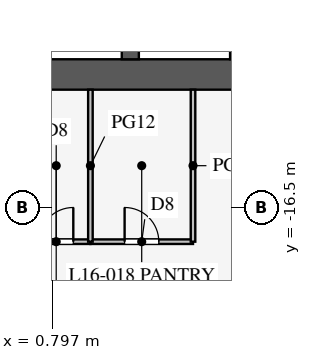
"""IFC4 building model, lengths in metres.
Left out: names, types, materials, properties, quantities, classifications, styles, units other than length and angle.
Written with IfcOpenShell. Run it as: python <this file> out.ifc"""

import sys

from ifc_helpers import new_model, si_unit, direction, frame, frame_2d, origin, place, context, subcontext, project, spatial, rectangle, extrude, element, fill, save


model = new_model("IFC4")
c1 = context("Model", 3, precision=1e-05, world=origin(), true_north=direction((0.0, 1.0)))
c2 = subcontext(c1, "Body", "Model", "MODEL_VIEW")
j1 = project(units=[si_unit("LENGTHUNIT", "METRE"), si_unit("PLANEANGLEUNIT", "RADIAN")], contexts=[c1])
p1 = place(None, origin())
s1 = spatial("IfcSite", under=j1, at=p1, CompositionType="ELEMENT")
p2 = place(p1, origin())
s2 = spatial("IfcBuilding", under=s1, at=p2, CompositionType="ELEMENT")
p3 = place(p2, frame((0.0, 0.0, 71.1)))
s3 = spatial("IfcBuildingStorey", under=s2, at=p3, CompositionType="ELEMENT", Elevation=71.1)
p4 = place(p3, frame((-10.97, -13.0, 0.0), z_axis=(0.0, 0.0, 1.0), x_axis=(1.0, 0.0, 0.0)))
e1 = element("IfcWall", 1, at=p4, inside=s3, PredefinedType="SHEAR", context=c2, shape_type="SweptSolid", body=[
    extrude(rectangle(XDim=21.939, YDim=0.8, at=frame_2d((10.97, 0.0))), origin(), (0.0, 0.0, 1.0), 4.2),
])
p5 = place(p4, frame((17.27, 0.0, 0.0)))
e2 = element("IfcOpeningElement", 2, at=p5, cuts=e1, PredefinedType="OPENING", context=c2, shape_type="SweptSolid", body=[
    extrude(rectangle(XDim=1.2, YDim=2.1, at=frame_2d((0.6, 1.05))), frame((0.0, 0.41, 0.0), z_axis=(0.0, -1.0, 0.0), x_axis=(1.0, 0.0, 0.0)), (0.0, 0.0, 1.0), 0.82),
])
p6 = place(p4, frame((3.47, 0.0, 0.0)))
e3 = element("IfcOpeningElement", 3, at=p6, cuts=e1, PredefinedType="OPENING", context=c2, shape_type="SweptSolid", body=[
    extrude(rectangle(XDim=1.2, YDim=2.1, at=frame_2d((0.6, 1.05))), frame((0.0, 0.41, 0.0), z_axis=(0.0, -1.0, 0.0), x_axis=(1.0, 0.0, 0.0)), (0.0, 0.0, 1.0), 0.82),
])
for number, where, z_axis, x_axis in (
    (4, (2.85, -10.025, 0.0), (0.0, 0.0, 1.0), (0.0, -1.0, 0.0)),
    (5, (5.7, -10.025, 0.0), (0.0, 0.0, 1.0), (0.0, -1.0, 0.0)),
):
    element("IfcWall", number, at=place(p3, frame(where, z_axis=z_axis, x_axis=x_axis)), inside=s3, PredefinedType="SHEAR", context=c2, shape_type="SweptSolid", body=[
        extrude(rectangle(XDim=2.575, YDim=0.45, at=frame_2d((1.288, 0.0))), origin(), (0.0, 0.0, 1.0), 4.2),
    ])
p7 = place(p3, frame((1.8, -17.4, 0.0), z_axis=(0.0, 0.0, 1.0), x_axis=(1.0, 0.0, 0.0)))
e6 = element("IfcWall", 6, at=p7, inside=s3, PredefinedType="PARTITIONING", context=c2, shape_type="SweptSolid", body=[
    extrude(rectangle(XDim=2.7, YDim=0.12, at=frame_2d((1.35, 0.0))), origin(), (0.0, 0.0, 1.0), 2.9),
])
p8 = place(p7, frame((0.9, 0.0, 0.15)))
e7 = element("IfcOpeningElement", 7, at=p8, cuts=e6, PredefinedType="OPENING", context=c2, shape_type="SweptSolid", body=[
    extrude(rectangle(XDim=0.9, YDim=2.1, at=frame_2d((0.45, 1.05))), frame((0.0, 0.07, 0.0), z_axis=(0.0, -1.0, 0.0), x_axis=(1.0, 0.0, 0.0)), (0.0, 0.0, 1.0), 0.14),
])
p9 = place(p3, frame((0.0, -17.4, 0.0), z_axis=(0.0, 0.0, 1.0), x_axis=(1.0, 0.0, 0.0)))
e8 = element("IfcWall", 8, at=p9, inside=s3, PredefinedType="PARTITIONING", context=c2, shape_type="SweptSolid", body=[
    extrude(rectangle(XDim=1.8, YDim=0.12, at=frame_2d((0.9, 0.0))), origin(), (0.0, 0.0, 1.0), 2.9),
])
p10 = place(p9, frame((0.45, 0.0, 0.15)))
e9 = element("IfcOpeningElement", 9, at=p10, cuts=e8, PredefinedType="OPENING", context=c2, shape_type="SweptSolid", body=[
    extrude(rectangle(XDim=0.9, YDim=2.1, at=frame_2d((0.45, 1.05))), frame((0.0, 0.07, 0.0), z_axis=(0.0, -1.0, 0.0), x_axis=(1.0, 0.0, 0.0)), (0.0, 0.0, 1.0), 0.14),
])
p11 = place(p3, frame((1.8, -13.4, 0.0), z_axis=(0.0, 0.0, 1.0), x_axis=(0.0, -1.0, 0.0)))
e10 = element("IfcWall", 10, at=p11, inside=s3, PredefinedType="PARTITIONING", context=c2, shape_type="SweptSolid", body=[
    extrude(rectangle(XDim=4.0, YDim=0.12, at=frame_2d((2.0, 0.0))), origin(), (0.0, 0.0, 1.0), 2.9),
])
p12 = place(p3, frame((4.5, -13.4, 0.0), z_axis=(0.0, 0.0, 1.0), x_axis=(0.0, -1.0, 0.0)))
e11 = element("IfcWall", 11, at=p12, inside=s3, PredefinedType="PARTITIONING", context=c2, shape_type="SweptSolid", body=[
    extrude(rectangle(XDim=4.0, YDim=0.12, at=frame_2d((2.0, 0.0))), origin(), (0.0, 0.0, 1.0), 2.8),
])
p13 = place(p10, origin())
e12 = element("IfcDoor", 12, at=p13, inside=s3, OperationType="SINGLE_SWING_RIGHT", PredefinedType="DOOR", context=c2, shape_type="SweptSolid", body=[
    extrude(rectangle(XDim=0.9, YDim=2.1, at=frame_2d((0.45, 1.05))), frame((0.0, 0.025, 0.0), z_axis=(0.0, -1.0, 0.0), x_axis=(1.0, 0.0, 0.0)), (0.0, 0.0, 1.0), 0.05),
])
fill(e9, e12)
p14 = place(p8, origin())
e13 = element("IfcDoor", 13, at=p14, inside=s3, OperationType="SINGLE_SWING_LEFT", PredefinedType="DOOR", context=c2, shape_type="SweptSolid", body=[
    extrude(rectangle(XDim=0.9, YDim=2.1, at=frame_2d((0.45, 1.05))), frame((0.0, 0.025, 0.0), z_axis=(0.0, -1.0, 0.0), x_axis=(1.0, 0.0, 0.0)), (0.0, 0.0, 1.0), 0.05),
])
fill(e7, e13)
save(model, sys.argv[1])
